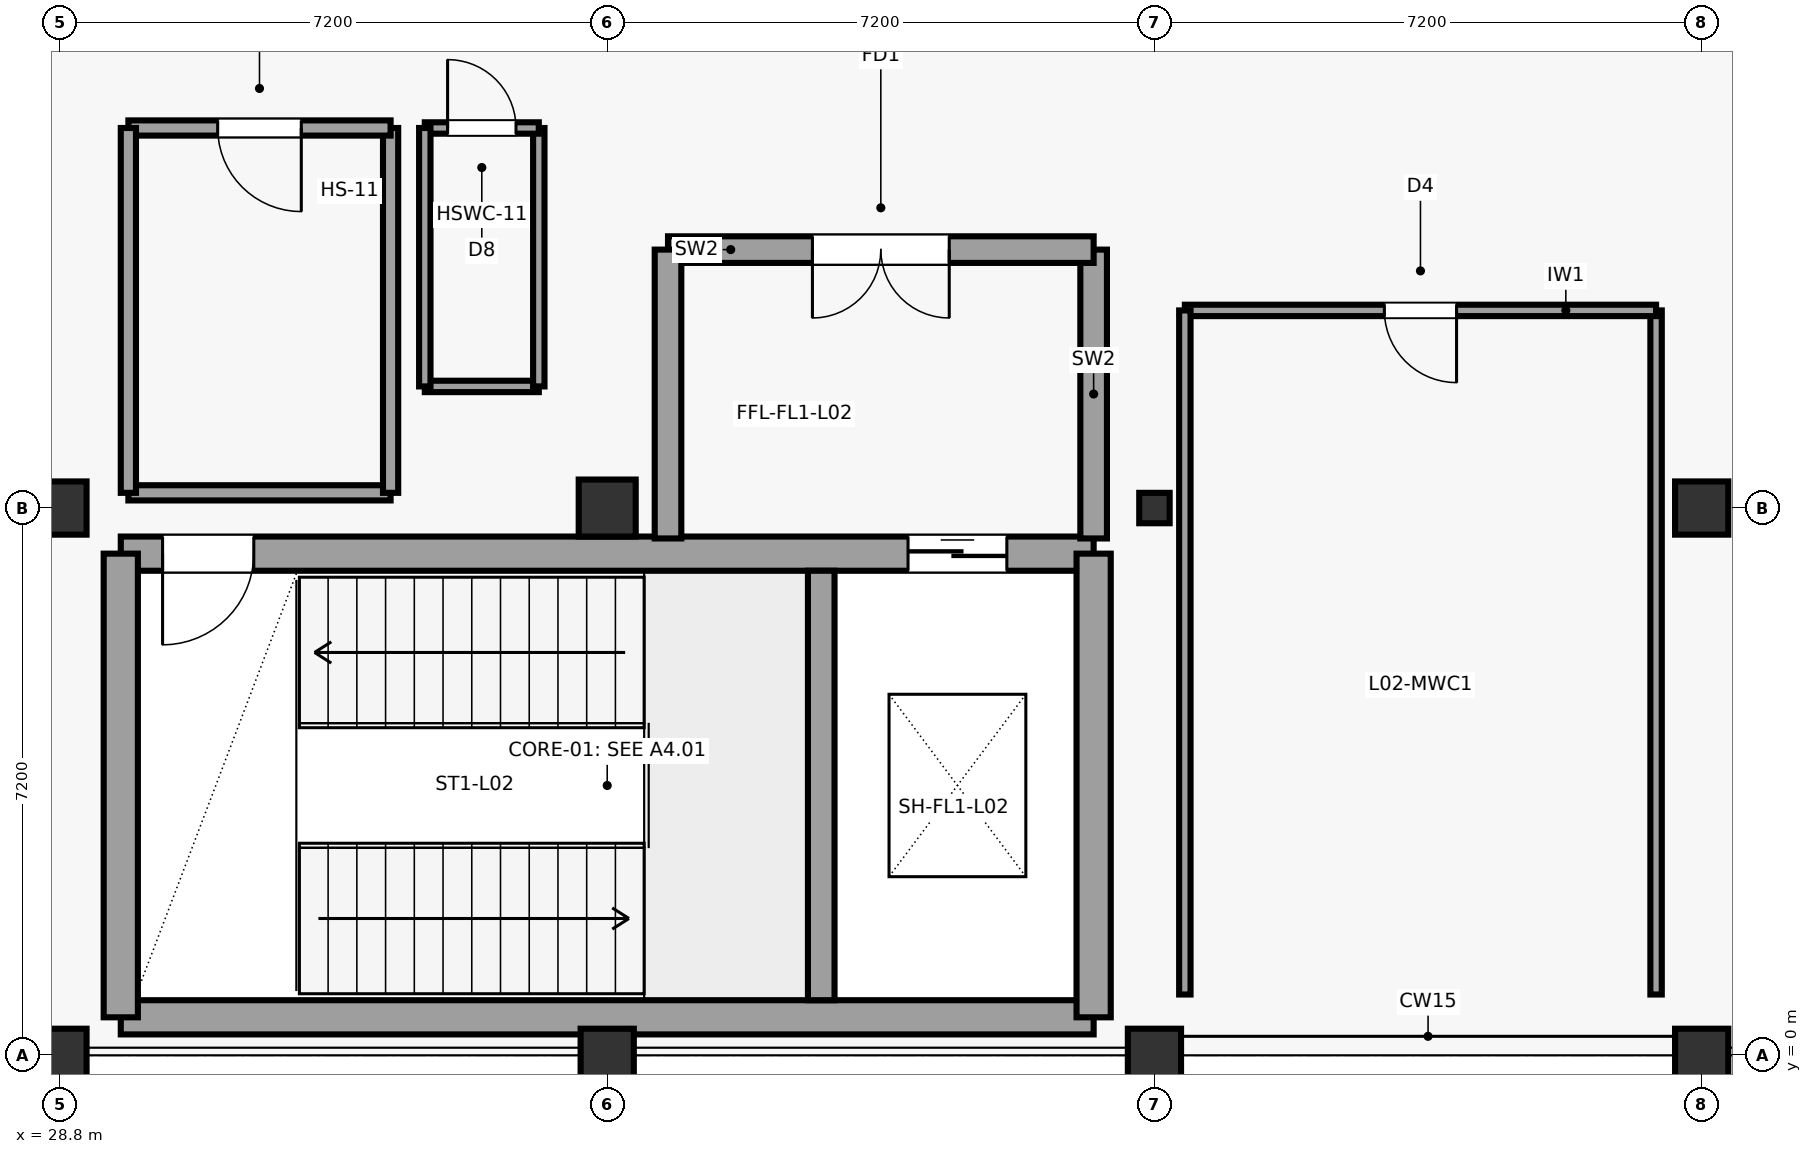
"""IFC4 building model, lengths in metres.
Left out: names, types, materials, properties, quantities, classifications, styles, units other than length and angle.
Written with IfcOpenShell. Run it as: python <this file> out.ifc"""

import sys

from ifc_helpers import new_model, si_unit, direction, frame, frame_2d, origin, origin_2d, place, context, subcontext, project, spatial, rectangle, hollow_rectangle, extrude, element, fill, save


model = new_model("IFC4")
c1 = context("Model", 3, precision=1e-05, world=origin(), true_north=direction((0.0, 1.0)))
c2 = subcontext(c1, "Body", "Model", "MODEL_VIEW")
j1 = project(units=[si_unit("LENGTHUNIT", "METRE"), si_unit("PLANEANGLEUNIT", "RADIAN")], contexts=[c1])
p1 = place(None, origin())
s1 = spatial("IfcSite", under=j1, at=p1, CompositionType="ELEMENT")
p2 = place(p1, origin())
s2 = spatial("IfcBuilding", under=s1, at=p2, CompositionType="ELEMENT")
p3 = place(p2, frame((0.0, 0.0, 9.6)))
s3 = spatial("IfcBuildingStorey", under=s2, at=p3, CompositionType="ELEMENT", Elevation=9.6)
for number, where, z_axis, x_axis in (
    (1, (28.8, 0.0, 0.0), (0.0, 0.0, 1.0), (1.0, 0.0, 0.0)),
    (2, (28.8, 7.2, 0.0), (0.0, 0.0, 1.0), (1.0, 0.0, 0.0)),
    (3, (36.0, 0.0, 0.0), (0.0, 0.0, 1.0), (1.0, 0.0, 0.0)),
):
    element("IfcColumn", number, at=place(p3, frame(where, z_axis=z_axis, x_axis=x_axis)), inside=s3, PredefinedType="COLUMN", context=c2, shape_type="SweptSolid", body=[
        extrude(rectangle(XDim=0.7, YDim=0.7, at=origin_2d()), origin(), (0.0, 0.0, 1.0), 4.2),
    ])
p4 = place(p3, frame((36.0, 7.2, 0.0), z_axis=(0.0, 0.0, 1.0), x_axis=(1.0, 0.0, 0.0)))
e4 = element("IfcColumn", 4, at=p4, inside=s3, PredefinedType="COLUMN", context=c2, shape_type="SweptSolid", body=[
    extrude(rectangle(XDim=0.75, YDim=0.75, at=origin_2d()), origin(), (0.0, 0.0, 1.0), 4.2),
])
p5 = place(p3, frame((43.2, 0.0, 0.0), z_axis=(0.0, 0.0, 1.0), x_axis=(1.0, 0.0, 0.0)))
e5 = element("IfcColumn", 5, at=p5, inside=s3, PredefinedType="COLUMN", context=c2, shape_type="SweptSolid", body=[
    extrude(rectangle(XDim=0.7, YDim=0.7, at=origin_2d()), origin(), (0.0, 0.0, 1.0), 4.2),
])
p6 = place(p3, frame((43.2, 7.2, 0.0), z_axis=(0.0, 0.0, 1.0), x_axis=(1.0, 0.0, 0.0)))
e6 = element("IfcColumn", 6, at=p6, inside=s3, PredefinedType="COLUMN", context=c2, shape_type="SweptSolid", body=[
    extrude(hollow_rectangle(XDim=0.4, YDim=0.4, WallThickness=0.02, at=origin_2d()), origin(), (0.0, 0.0, 1.0), 4.2),
])
for number, where, z_axis, x_axis in (
    (7, (50.4, 0.0, 0.0), (0.0, 0.0, 1.0), (1.0, 0.0, 0.0)),
    (8, (50.4, 7.2, 0.0), (0.0, 0.0, 1.0), (1.0, 0.0, 0.0)),
):
    element("IfcColumn", number, at=place(p3, frame(where, z_axis=z_axis, x_axis=x_axis)), inside=s3, PredefinedType="COLUMN", context=c2, shape_type="SweptSolid", body=[
        extrude(rectangle(XDim=0.7, YDim=0.7, at=origin_2d()), origin(), (0.0, 0.0, 1.0), 4.2),
    ])
p7 = place(p3, frame((29.6, 0.5, 0.0), z_axis=(0.0, 0.0, 1.0), x_axis=(1.0, 0.0, 0.0)))
e9 = element("IfcWall", 9, at=p7, inside=s3, PredefinedType="SHEAR", context=c2, shape_type="SweptSolid", body=[
    extrude(rectangle(XDim=12.8, YDim=0.45, at=frame_2d((6.4, 0.0))), origin(), (0.0, 0.0, 1.0), 3.88),
])
p8 = place(p3, frame((29.6, 6.6, 0.0), z_axis=(0.0, 0.0, 1.0), x_axis=(1.0, 0.0, 0.0)))
e10 = element("IfcWall", 10, at=p8, inside=s3, PredefinedType="SHEAR", context=c2, shape_type="SweptSolid", body=[
    extrude(rectangle(XDim=12.8, YDim=0.45, at=frame_2d((6.4, 0.0))), origin(), (0.0, 0.0, 1.0), 3.88),
])
p9 = place(p8, frame((0.55, 0.0, 0.0)))
e11 = element("IfcOpeningElement", 11, at=p9, cuts=e10, PredefinedType="OPENING", context=c2, shape_type="SweptSolid", body=[
    extrude(rectangle(XDim=1.2, YDim=2.25, at=frame_2d((0.6, 1.125))), frame((0.0, 0.235, 0.0), z_axis=(0.0, -1.0, 0.0), x_axis=(1.0, 0.0, 0.0)), (0.0, 0.0, 1.0), 0.47),
])
p10 = place(p8, frame((10.358, 0.0, 0.0)))
e12 = element("IfcOpeningElement", 12, at=p10, cuts=e10, PredefinedType="OPENING", context=c2, shape_type="SweptSolid", body=[
    extrude(rectangle(XDim=1.3, YDim=2.25, at=frame_2d((0.65, 1.125))), frame((0.0, 0.235, 0.0), z_axis=(0.0, -1.0, 0.0), x_axis=(1.0, 0.0, 0.0)), (0.0, 0.0, 1.0), 0.47),
])
for number, where, z_axis, x_axis in (
    (13, (29.6, 0.5, 0.0), (0.0, 0.0, 1.0), (0.0, 1.0, 0.0)),
    (14, (42.4, 0.5, 0.0), (0.0, 0.0, 1.0), (0.0, 1.0, 0.0)),
):
    element("IfcWall", number, at=place(p3, frame(where, z_axis=z_axis, x_axis=x_axis)), inside=s3, PredefinedType="SHEAR", context=c2, shape_type="SweptSolid", body=[
        extrude(rectangle(XDim=6.1, YDim=0.45, at=frame_2d((3.05, 0.0))), origin(), (0.0, 0.0, 1.0), 3.88),
    ])
p11 = place(p3, frame((38.816, 0.725, 0.0), z_axis=(0.0, 0.0, 1.0), x_axis=(0.0, 1.0, 0.0)))
e15 = element("IfcWall", 15, at=p11, inside=s3, PredefinedType="SHEAR", context=c2, shape_type="SweptSolid", body=[
    extrude(rectangle(XDim=5.65, YDim=0.35, at=frame_2d((2.825, 0.0))), origin(), (0.0, 0.0, 1.0), 3.88),
])
p12 = place(p3, frame((42.4, 6.8, 0.0), z_axis=(0.0, 0.0, 1.0), x_axis=(0.0, 1.0, 0.0)))
e16 = element("IfcWall", 16, at=p12, inside=s3, PredefinedType="SHEAR", context=c2, shape_type="SweptSolid", body=[
    extrude(rectangle(XDim=3.8, YDim=0.35, at=frame_2d((1.9, 0.0))), origin(), (0.0, 0.0, 1.0), 2.94),
])
p13 = place(p3, frame((42.4, 10.6, 0.0), z_axis=(0.0, 0.0, 1.0), x_axis=(-1.0, 0.0, 0.0)))
e17 = element("IfcWall", 17, at=p13, inside=s3, PredefinedType="SHEAR", context=c2, shape_type="SweptSolid", body=[
    extrude(rectangle(XDim=5.6, YDim=0.35, at=frame_2d((2.8, 0.0))), origin(), (0.0, 0.0, 1.0), 2.94),
])
p14 = place(p13, frame((1.9, 0.0, 0.0)))
e18 = element("IfcOpeningElement", 18, at=p14, cuts=e17, PredefinedType="OPENING", context=c2, shape_type="SweptSolid", body=[
    extrude(rectangle(XDim=1.8, YDim=2.3, at=frame_2d((0.9, 1.15))), frame((0.0, 0.185, 0.0), z_axis=(0.0, -1.0, 0.0), x_axis=(1.0, 0.0, 0.0)), (0.0, 0.0, 1.0), 0.37),
])
p15 = place(p3, frame((36.8, 10.6, 0.0), z_axis=(0.0, 0.0, 1.0), x_axis=(0.0, -1.0, 0.0)))
e19 = element("IfcWall", 19, at=p15, inside=s3, PredefinedType="SHEAR", context=c2, shape_type="SweptSolid", body=[
    extrude(rectangle(XDim=3.8, YDim=0.35, at=frame_2d((1.9, 0.0))), origin(), (0.0, 0.0, 1.0), 2.94),
])
p16 = place(p3, frame((49.8, 0.8, 0.0), z_axis=(0.0, 0.0, 1.0), x_axis=(0.0, 1.0, 0.0)))
e20 = element("IfcWall", 20, at=p16, inside=s3, PredefinedType="PARTITIONING", context=c2, shape_type="SweptSolid", body=[
    extrude(rectangle(XDim=9.0, YDim=0.15, at=frame_2d((4.5, 0.0))), origin(), (0.0, 0.0, 1.0), 2.94),
])
p17 = place(p3, frame((49.8, 9.8, 0.0), z_axis=(0.0, 0.0, 1.0), x_axis=(-1.0, 0.0, 0.0)))
e21 = element("IfcWall", 21, at=p17, inside=s3, PredefinedType="PARTITIONING", context=c2, shape_type="SweptSolid", body=[
    extrude(rectangle(XDim=6.2, YDim=0.15, at=frame_2d((3.1, 0.0))), origin(), (0.0, 0.0, 1.0), 2.94),
])
p18 = place(p17, frame((2.625, 0.0, 0.0)))
e22 = element("IfcOpeningElement", 22, at=p18, cuts=e21, PredefinedType="OPENING", context=c2, shape_type="SweptSolid", body=[
    extrude(rectangle(XDim=0.95, YDim=2.15, at=frame_2d((0.475, 1.075))), frame((0.0, 0.085, 0.0), z_axis=(0.0, -1.0, 0.0), x_axis=(1.0, 0.0, 0.0)), (0.0, 0.0, 1.0), 0.17),
])
p19 = place(p3, frame((43.6, 9.8, 0.0), z_axis=(0.0, 0.0, 1.0), x_axis=(0.0, -1.0, 0.0)))
e23 = element("IfcWall", 23, at=p19, inside=s3, PredefinedType="PARTITIONING", context=c2, shape_type="SweptSolid", body=[
    extrude(rectangle(XDim=9.0, YDim=0.15, at=frame_2d((4.5, 0.0))), origin(), (0.0, 0.0, 1.0), 2.94),
])
p20 = place(p3, frame((29.7, 7.4, 0.0), z_axis=(0.0, 0.0, 1.0), x_axis=(1.0, 0.0, 0.0)))
e24 = element("IfcWall", 24, at=p20, inside=s3, PredefinedType="PARTITIONING", context=c2, shape_type="SweptSolid", body=[
    extrude(rectangle(XDim=3.45, YDim=0.2, at=frame_2d((1.725, 0.0))), origin(), (0.0, 0.0, 1.0), 2.94),
])
p21 = place(p3, frame((33.15, 7.4, 0.0), z_axis=(0.0, 0.0, 1.0), x_axis=(0.0, 1.0, 0.0)))
e25 = element("IfcWall", 25, at=p21, inside=s3, PredefinedType="PARTITIONING", context=c2, shape_type="SweptSolid", body=[
    extrude(rectangle(XDim=4.8, YDim=0.2, at=frame_2d((2.4, 0.0))), origin(), (0.0, 0.0, 1.0), 2.94),
])
p22 = place(p3, frame((33.15, 12.2, 0.0), z_axis=(0.0, 0.0, 1.0), x_axis=(-1.0, 0.0, 0.0)))
e26 = element("IfcWall", 26, at=p22, inside=s3, PredefinedType="PARTITIONING", context=c2, shape_type="SweptSolid", body=[
    extrude(rectangle(XDim=3.45, YDim=0.2, at=frame_2d((1.725, 0.0))), origin(), (0.0, 0.0, 1.0), 2.94),
])
p23 = place(p22, frame((1.175, 0.0, 0.0)))
e27 = element("IfcOpeningElement", 27, at=p23, cuts=e26, PredefinedType="OPENING", context=c2, shape_type="SweptSolid", body=[
    extrude(rectangle(XDim=1.1, YDim=2.25, at=frame_2d((0.55, 1.125))), frame((0.0, 0.11, 0.0), z_axis=(0.0, -1.0, 0.0), x_axis=(1.0, 0.0, 0.0)), (0.0, 0.0, 1.0), 0.22),
])
p24 = place(p3, frame((29.7, 12.2, 0.0), z_axis=(0.0, 0.0, 1.0), x_axis=(0.0, -1.0, 0.0)))
e28 = element("IfcWall", 28, at=p24, inside=s3, PredefinedType="PARTITIONING", context=c2, shape_type="SweptSolid", body=[
    extrude(rectangle(XDim=4.8, YDim=0.2, at=frame_2d((2.4, 0.0))), origin(), (0.0, 0.0, 1.0), 2.94),
])
p25 = place(p3, frame((33.6, 8.8, 0.0), z_axis=(0.0, 0.0, 1.0), x_axis=(1.0, 0.0, 0.0)))
e29 = element("IfcWall", 29, at=p25, inside=s3, PredefinedType="PARTITIONING", context=c2, shape_type="SweptSolid", body=[
    extrude(rectangle(XDim=1.5, YDim=0.15, at=frame_2d((0.75, 0.0))), origin(), (0.0, 0.0, 1.0), 2.94),
])
p26 = place(p3, frame((35.1, 8.8, 0.0), z_axis=(0.0, 0.0, 1.0), x_axis=(0.0, 1.0, 0.0)))
e30 = element("IfcWall", 30, at=p26, inside=s3, PredefinedType="PARTITIONING", context=c2, shape_type="SweptSolid", body=[
    extrude(rectangle(XDim=3.4, YDim=0.15, at=frame_2d((1.7, 0.0))), origin(), (0.0, 0.0, 1.0), 2.94),
])
p27 = place(p3, frame((35.1, 12.2, 0.0), z_axis=(0.0, 0.0, 1.0), x_axis=(-1.0, 0.0, 0.0)))
e31 = element("IfcWall", 31, at=p27, inside=s3, PredefinedType="PARTITIONING", context=c2, shape_type="SweptSolid", body=[
    extrude(rectangle(XDim=1.5, YDim=0.15, at=frame_2d((0.75, 0.0))), origin(), (0.0, 0.0, 1.0), 2.94),
])
p28 = place(p27, frame((0.3, 0.0, 0.0)))
e32 = element("IfcOpeningElement", 32, at=p28, cuts=e31, PredefinedType="OPENING", context=c2, shape_type="SweptSolid", body=[
    extrude(rectangle(XDim=0.9, YDim=2.15, at=frame_2d((0.45, 1.075))), frame((0.0, 0.085, 0.0), z_axis=(0.0, -1.0, 0.0), x_axis=(1.0, 0.0, 0.0)), (0.0, 0.0, 1.0), 0.17),
])
p29 = place(p3, frame((33.6, 12.2, 0.0), z_axis=(0.0, 0.0, 1.0), x_axis=(0.0, -1.0, 0.0)))
e33 = element("IfcWall", 33, at=p29, inside=s3, PredefinedType="PARTITIONING", context=c2, shape_type="SweptSolid", body=[
    extrude(rectangle(XDim=3.4, YDim=0.15, at=frame_2d((1.7, 0.0))), origin(), (0.0, 0.0, 1.0), 2.94),
])
p30 = place(p9, frame((1.2, 0.0, 0.0), z_axis=(0.0, 0.0, 1.0), x_axis=(-1.0, 0.0, 0.0)))
e34 = element("IfcDoor", 34, at=p30, inside=s3, OperationType="SINGLE_SWING_LEFT", PredefinedType="DOOR", context=c2, shape_type="SweptSolid", body=[
    extrude(rectangle(XDim=1.2, YDim=2.25, at=frame_2d((0.6, 1.125))), frame((0.0, 0.025, 0.0), z_axis=(0.0, -1.0, 0.0), x_axis=(1.0, 0.0, 0.0)), (0.0, 0.0, 1.0), 0.05),
])
fill(e11, e34)
p31 = place(p10, origin())
e35 = element("IfcDoor", 35, at=p31, inside=s3, OperationType="SLIDING_TO_RIGHT", PredefinedType="DOOR", context=c2, shape_type="SweptSolid", body=[
    extrude(rectangle(XDim=1.3, YDim=2.25, at=frame_2d((0.65, 1.125))), frame((0.0, 0.025, 0.0), z_axis=(0.0, -1.0, 0.0), x_axis=(1.0, 0.0, 0.0)), (0.0, 0.0, 1.0), 0.05),
])
fill(e12, e35)
p32 = place(p14, origin())
e36 = element("IfcDoor", 36, at=p32, inside=s3, OperationType="DOUBLE_DOOR_SINGLE_SWING", PredefinedType="DOOR", context=c2, shape_type="SweptSolid", body=[
    extrude(rectangle(XDim=1.8, YDim=2.3, at=frame_2d((0.9, 1.15))), frame((0.0, 0.025, 0.0), z_axis=(0.0, -1.0, 0.0), x_axis=(1.0, 0.0, 0.0)), (0.0, 0.0, 1.0), 0.05),
])
fill(e18, e36)
p33 = place(p18, origin())
e37 = element("IfcDoor", 37, at=p33, inside=s3, OperationType="SINGLE_SWING_LEFT", PredefinedType="DOOR", context=c2, shape_type="SweptSolid", body=[
    extrude(rectangle(XDim=0.95, YDim=2.15, at=frame_2d((0.475, 1.075))), frame((0.0, 0.025, 0.0), z_axis=(0.0, -1.0, 0.0), x_axis=(1.0, 0.0, 0.0)), (0.0, 0.0, 1.0), 0.05),
])
fill(e22, e37)
p34 = place(p23, origin())
e38 = element("IfcDoor", 38, at=p34, inside=s3, OperationType="SINGLE_SWING_LEFT", PredefinedType="DOOR", context=c2, shape_type="SweptSolid", body=[
    extrude(rectangle(XDim=1.1, YDim=2.25, at=frame_2d((0.55, 1.125))), frame((0.0, 0.025, 0.0), z_axis=(0.0, -1.0, 0.0), x_axis=(1.0, 0.0, 0.0)), (0.0, 0.0, 1.0), 0.05),
])
fill(e27, e38)
p35 = place(p28, frame((0.9, 0.0, 0.0), z_axis=(0.0, 0.0, 1.0), x_axis=(-1.0, 0.0, 0.0)))
e39 = element("IfcDoor", 39, at=p35, inside=s3, OperationType="SINGLE_SWING_RIGHT", PredefinedType="DOOR", context=c2, shape_type="SweptSolid", body=[
    extrude(rectangle(XDim=0.9, YDim=2.15, at=frame_2d((0.45, 1.075))), frame((0.0, 0.025, 0.0), z_axis=(0.0, -1.0, 0.0), x_axis=(1.0, 0.0, 0.0)), (0.0, 0.0, 1.0), 0.05),
])
fill(e32, e39)
save(model, sys.argv[1])
